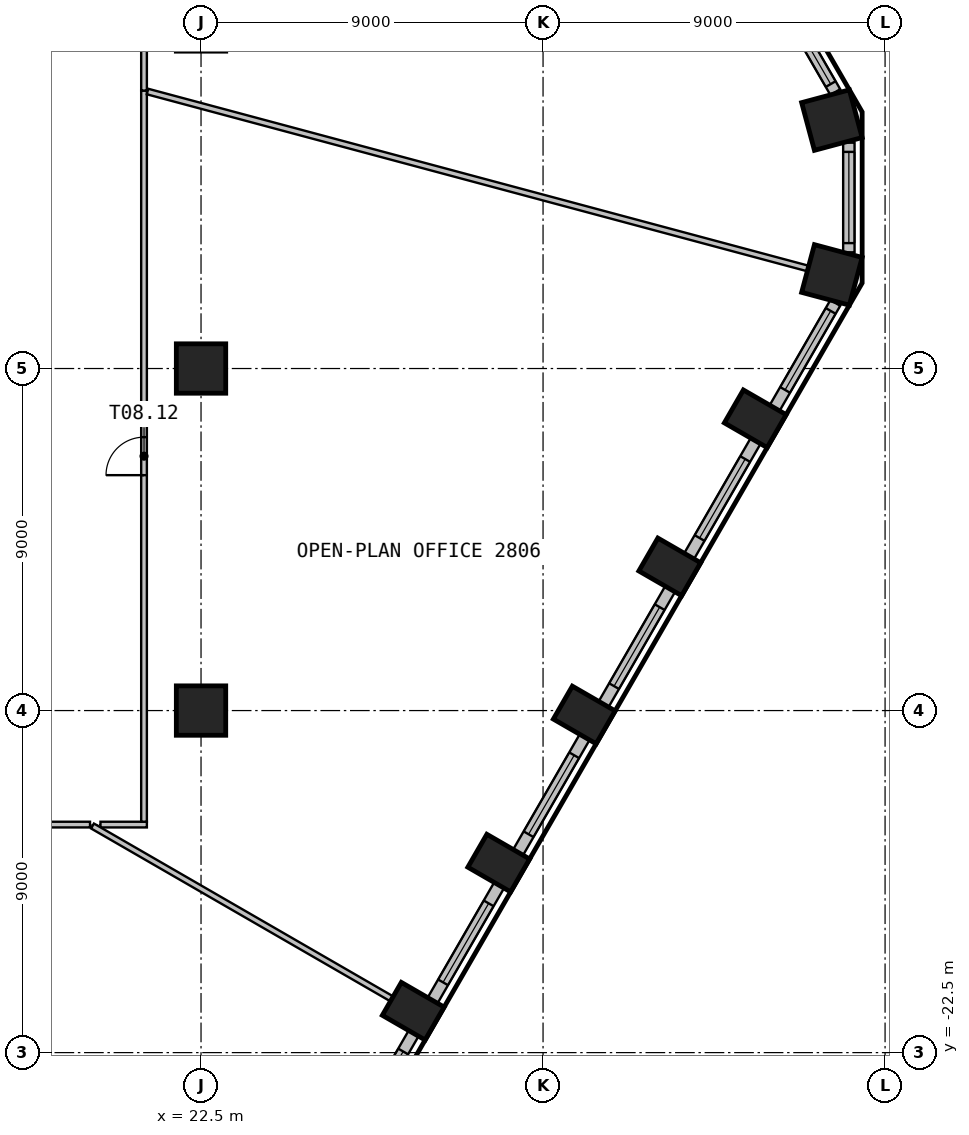
"""IFC4 building model, lengths in metres.
Left out: names, types, materials, properties, quantities, classifications, styles, units other than length and angle.
Written with IfcOpenShell. Run it as: python <this file> out.ifc"""

import sys

from ifc_helpers import new_model, si_unit, direction, frame, frame_2d, origin, origin_2d, place, context, subcontext, project, spatial, rectangle, circle, extrude, element, fill, save


model = new_model("IFC4")
c1 = context("Model", 3, precision=1e-05, world=origin(), true_north=direction((0.0, 1.0)))
c2 = subcontext(c1, "Body", "Model", "MODEL_VIEW")
j1 = project(units=[si_unit("LENGTHUNIT", "METRE"), si_unit("PLANEANGLEUNIT", "RADIAN")], contexts=[c1])
p1 = place(None, origin())
s1 = spatial("IfcSite", under=j1, at=p1, CompositionType="ELEMENT")
p2 = place(p1, origin())
s2 = spatial("IfcBuilding", under=s1, at=p2, CompositionType="ELEMENT")
p3 = place(p2, frame((0.0, 0.0, 116.4)))
s3 = spatial("IfcBuildingStorey", under=s2, at=p3, CompositionType="ELEMENT", Elevation=116.4)
for number, where, z_axis, x_axis in (
    (1, (28.084, -21.411, 0.0), (0.0, 0.0, 1.0), (0.5, 0.866, 0.0)),
    (2, (30.334, -17.513, 0.0), (0.0, 0.0, 1.0), (0.5, 0.866, 0.0)),
    (3, (32.584, -13.616, 0.0), (0.0, 0.0, 1.0), (0.5, 0.866, 0.0)),
    (4, (34.834, -9.719, 0.0), (0.0, 0.0, 1.0), (0.5, 0.866, 0.0)),
    (5, (37.084, -5.822, 0.0), (0.0, 0.0, 1.0), (0.5, 0.866, 0.0)),
):
    element("IfcColumn", number, at=place(p3, frame(where, z_axis=z_axis, x_axis=x_axis)), inside=s3, PredefinedType="COLUMN", context=c2, shape_type="SweptSolid", body=[
        extrude(rectangle(XDim=1.0, YDim=1.3, at=origin_2d()), origin(), (0.0, 0.0, 1.0), 3.525),
    ])
for number, where, z_axis, x_axis in (
    (6, (39.101, -2.037, 0.0), (0.0, 0.0, 1.0), (0.259, 0.966, 0.0)),
    (7, (39.101, 2.037, 0.0), (0.0, 0.0, 1.0), (-0.259, 0.966, 0.0)),
):
    element("IfcColumn", number, at=place(p3, frame(where, z_axis=z_axis, x_axis=x_axis)), inside=s3, PredefinedType="COLUMN", context=c2, shape_type="SweptSolid", body=[
        extrude(rectangle(XDim=1.3, YDim=1.3, at=origin_2d()), origin(), (0.0, 0.0, 1.0), 3.525),
    ])
for number, where, z_axis, x_axis in (
    (8, (22.5, -13.5, 0.0), (0.0, 0.0, 1.0), (1.0, 0.0, 0.0)),
    (9, (22.5, -4.5, 0.0), (0.0, 0.0, 1.0), (1.0, 0.0, 0.0)),
):
    element("IfcColumn", number, at=place(p3, frame(where, z_axis=z_axis, x_axis=x_axis)), inside=s3, PredefinedType="COLUMN", context=c2, shape_type="SweptSolid", body=[
        extrude(circle(Radius=0.65, at=origin_2d()), origin(), (0.0, 0.0, 1.0), 3.525),
    ])
p4 = place(p3, frame((26.344, -25.024, 0.0), z_axis=(0.0, 0.0, 1.0), x_axis=(0.499996256241, 0.866027565234, 0.0)))
e10 = element("IfcWall", 10, at=p4, inside=s3, PredefinedType="SOLIDWALL", context=c2, shape_type="SweptSolid", body=[
    extrude(rectangle(XDim=3.499, YDim=0.3, at=frame_2d((1.75, 0.0))), origin(), (0.0, 0.0, 1.0), 3.525),
])
p5 = place(p4, frame((0.55, 0.0, 0.9)))
e11 = element("IfcOpeningElement", 11, at=p5, cuts=e10, PredefinedType="OPENING", context=c2, shape_type="SweptSolid", body=[
    extrude(rectangle(XDim=2.4, YDim=2.1, at=frame_2d((1.2, 1.05))), frame((0.0, 0.16, 0.0), z_axis=(0.0, -1.0, 0.0), x_axis=(1.0, 0.0, 0.0)), (0.0, 0.0, 1.0), 0.32),
])
p6 = place(p3, frame((28.594, -21.127, 0.0), z_axis=(0.0, 0.0, 1.0), x_axis=(0.499996256241, 0.866027565234, 0.0)))
e12 = element("IfcWall", 12, at=p6, inside=s3, PredefinedType="SOLIDWALL", context=c2, shape_type="SweptSolid", body=[
    extrude(rectangle(XDim=3.499, YDim=0.3, at=frame_2d((1.75, 0.0))), origin(), (0.0, 0.0, 1.0), 3.525),
])
p7 = place(p6, frame((0.55, 0.0, 0.9)))
e13 = element("IfcOpeningElement", 13, at=p7, cuts=e12, PredefinedType="OPENING", context=c2, shape_type="SweptSolid", body=[
    extrude(rectangle(XDim=2.4, YDim=2.1, at=frame_2d((1.2, 1.05))), frame((0.0, 0.16, 0.0), z_axis=(0.0, -1.0, 0.0), x_axis=(1.0, 0.0, 0.0)), (0.0, 0.0, 1.0), 0.32),
])
p8 = place(p3, frame((30.844, -17.23, 0.0), z_axis=(0.0, 0.0, 1.0), x_axis=(0.499996256241, 0.866027565234, 0.0)))
e14 = element("IfcWall", 14, at=p8, inside=s3, PredefinedType="SOLIDWALL", context=c2, shape_type="SweptSolid", body=[
    extrude(rectangle(XDim=3.499, YDim=0.3, at=frame_2d((1.75, 0.0))), origin(), (0.0, 0.0, 1.0), 3.525),
])
p9 = place(p8, frame((0.55, 0.0, 0.9)))
e15 = element("IfcOpeningElement", 15, at=p9, cuts=e14, PredefinedType="OPENING", context=c2, shape_type="SweptSolid", body=[
    extrude(rectangle(XDim=2.4, YDim=2.1, at=frame_2d((1.2, 1.05))), frame((0.0, 0.16, 0.0), z_axis=(0.0, -1.0, 0.0), x_axis=(1.0, 0.0, 0.0)), (0.0, 0.0, 1.0), 0.32),
])
p10 = place(p3, frame((33.094, -13.333, 0.0), z_axis=(0.0, 0.0, 1.0), x_axis=(0.499996256241, 0.866027565234, 0.0)))
e16 = element("IfcWall", 16, at=p10, inside=s3, PredefinedType="SOLIDWALL", context=c2, shape_type="SweptSolid", body=[
    extrude(rectangle(XDim=3.499, YDim=0.3, at=frame_2d((1.75, 0.0))), origin(), (0.0, 0.0, 1.0), 3.525),
])
p11 = place(p10, frame((0.55, 0.0, 0.9)))
e17 = element("IfcOpeningElement", 17, at=p11, cuts=e16, PredefinedType="OPENING", context=c2, shape_type="SweptSolid", body=[
    extrude(rectangle(XDim=2.4, YDim=2.1, at=frame_2d((1.2, 1.05))), frame((0.0, 0.16, 0.0), z_axis=(0.0, -1.0, 0.0), x_axis=(1.0, 0.0, 0.0)), (0.0, 0.0, 1.0), 0.32),
])
p12 = place(p3, frame((35.344, -9.436, 0.0), z_axis=(0.0, 0.0, 1.0), x_axis=(0.499996256241, 0.866027565234, 0.0)))
e18 = element("IfcWall", 18, at=p12, inside=s3, PredefinedType="SOLIDWALL", context=c2, shape_type="SweptSolid", body=[
    extrude(rectangle(XDim=3.499, YDim=0.3, at=frame_2d((1.75, 0.0))), origin(), (0.0, 0.0, 1.0), 3.525),
])
p13 = place(p12, frame((0.55, 0.0, 0.9)))
e19 = element("IfcOpeningElement", 19, at=p13, cuts=e18, PredefinedType="OPENING", context=c2, shape_type="SweptSolid", body=[
    extrude(rectangle(XDim=2.4, YDim=2.1, at=frame_2d((1.2, 1.05))), frame((0.0, 0.16, 0.0), z_axis=(0.0, -1.0, 0.0), x_axis=(1.0, 0.0, 0.0)), (0.0, 0.0, 1.0), 0.32),
])
p14 = place(p3, frame((37.594, -5.539, 0.0), z_axis=(0.0, 0.0, 1.0), x_axis=(0.500004907028, 0.866022570692, 0.0)))
e20 = element("IfcWall", 20, at=p14, inside=s3, PredefinedType="SOLIDWALL", context=c2, shape_type="SweptSolid", body=[
    extrude(rectangle(XDim=3.192, YDim=0.3, at=frame_2d((1.596, 0.0))), origin(), (0.0, 0.0, 1.0), 3.525),
])
p15 = place(p14, frame((0.55, 0.0, 0.9)))
e21 = element("IfcOpeningElement", 21, at=p15, cuts=e20, PredefinedType="OPENING", context=c2, shape_type="SweptSolid", body=[
    extrude(rectangle(XDim=2.4, YDim=2.1, at=frame_2d((1.2, 1.05))), frame((0.0, 0.16, 0.0), z_axis=(0.0, -1.0, 0.0), x_axis=(1.0, 0.0, 0.0)), (0.0, 0.0, 1.0), 0.32),
])
p16 = place(p3, frame((39.547, -1.443, 0.0), z_axis=(0.0, 0.0, 1.0), x_axis=(0.0, 1.0, 0.0)))
e22 = element("IfcWall", 22, at=p16, inside=s3, PredefinedType="SOLIDWALL", context=c2, shape_type="SweptSolid", body=[
    extrude(rectangle(XDim=2.886, YDim=0.3, at=frame_2d((1.443, 0.0))), origin(), (0.0, 0.0, 1.0), 3.525),
])
p17 = place(p16, frame((0.243, 0.0, 0.9)))
e23 = element("IfcOpeningElement", 23, at=p17, cuts=e22, PredefinedType="OPENING", context=c2, shape_type="SweptSolid", body=[
    extrude(rectangle(XDim=2.4, YDim=2.1, at=frame_2d((1.2, 1.05))), frame((0.0, 0.16, 0.0), z_axis=(0.0, -1.0, 0.0), x_axis=(1.0, 0.0, 0.0)), (0.0, 0.0, 1.0), 0.32),
])
p18 = place(p3, frame((39.19, 2.774, 0.0), z_axis=(0.0, 0.0, 1.0), x_axis=(-0.500004907028, 0.866022570692, 0.0)))
e24 = element("IfcWall", 24, at=p18, inside=s3, PredefinedType="SOLIDWALL", context=c2, shape_type="SweptSolid", body=[
    extrude(rectangle(XDim=3.192, YDim=0.3, at=frame_2d((1.596, 0.0))), origin(), (0.0, 0.0, 1.0), 3.525),
])
p19 = place(p18, frame((0.243, 0.0, 0.9)))
e25 = element("IfcOpeningElement", 25, at=p19, cuts=e24, PredefinedType="OPENING", context=c2, shape_type="SweptSolid", body=[
    extrude(rectangle(XDim=2.4, YDim=2.1, at=frame_2d((1.2, 1.05))), frame((0.0, 0.16, 0.0), z_axis=(0.0, -1.0, 0.0), x_axis=(1.0, 0.0, 0.0)), (0.0, 0.0, 1.0), 0.32),
])
p20 = place(p3, frame((11.25, -16.5, 0.0), z_axis=(0.0, 0.0, 1.0), x_axis=(1.0, 0.0, 0.0)))
e26 = element("IfcWall", 26, at=p20, inside=s3, PredefinedType="PARTITIONING", context=c2, shape_type="SweptSolid", body=[
    extrude(rectangle(XDim=8.329, YDim=0.15, at=frame_2d((4.165, 0.0))), origin(), (0.0, 0.0, 1.0), 3.525),
])
p21 = place(p3, frame((19.854, -16.5, 0.0), z_axis=(0.0, 0.0, 1.0), x_axis=(1.0, 0.0, 0.0)))
e27 = element("IfcWall", 27, at=p21, inside=s3, PredefinedType="PARTITIONING", context=c2, shape_type="SweptSolid", body=[
    extrude(rectangle(XDim=1.221, YDim=0.15, at=frame_2d((0.61, 0.0))), origin(), (0.0, 0.0, 1.0), 3.525),
])
p22 = place(p3, frame((19.644, -16.538, 0.0), z_axis=(0.0, 0.0, 1.0), x_axis=(0.866004606565, -0.500036020111, 0.0)))
e28 = element("IfcWall", 28, at=p22, inside=s3, PredefinedType="PARTITIONING", context=c2, shape_type="SweptSolid", body=[
    extrude(rectangle(XDim=9.076, YDim=0.15, at=frame_2d((4.538, 0.0))), origin(), (0.0, 0.0, 1.0), 3.525),
])
p23 = place(p3, frame((21.0, -16.425, 0.0), z_axis=(0.0, 0.0, 1.0), x_axis=(0.0, 1.0, 0.0)))
e29 = element("IfcWall", 29, at=p23, inside=s3, PredefinedType="PARTITIONING", context=c2, shape_type="SweptSolid", body=[
    extrude(rectangle(XDim=19.238, YDim=0.15, at=frame_2d((9.619, 0.0))), origin(), (0.0, 0.0, 1.0), 3.525),
])
p24 = place(p23, frame((9.119, 0.0, 0.0)))
e30 = element("IfcOpeningElement", 30, at=p24, cuts=e29, PredefinedType="OPENING", context=c2, shape_type="SweptSolid", body=[
    extrude(rectangle(XDim=1.0, YDim=2.1, at=frame_2d((0.5, 1.05))), frame((0.0, 0.085, 0.0), z_axis=(0.0, -1.0, 0.0), x_axis=(1.0, 0.0, 0.0)), (0.0, 0.0, 1.0), 0.17),
])
p25 = place(p3, frame((21.0, 2.813, 0.0), z_axis=(0.0, 0.0, 1.0), x_axis=(0.0, 1.0, 0.0)))
e31 = element("IfcWall", 31, at=p25, inside=s3, PredefinedType="PARTITIONING", context=c2, shape_type="SweptSolid", body=[
    extrude(rectangle(XDim=13.612, YDim=0.15, at=frame_2d((6.806, 0.0))), origin(), (0.0, 0.0, 1.0), 3.525),
])
p26 = place(p25, frame((6.306, 0.0, 0.0)))
e32 = element("IfcOpeningElement", 32, at=p26, cuts=e31, PredefinedType="OPENING", context=c2, shape_type="SweptSolid", body=[
    extrude(rectangle(XDim=1.0, YDim=2.1, at=frame_2d((0.5, 1.05))), frame((0.0, 0.085, 0.0), z_axis=(0.0, -1.0, 0.0), x_axis=(1.0, 0.0, 0.0)), (0.0, 0.0, 1.0), 0.17),
])
p27 = place(p3, frame((38.454, -1.864, 0.0), z_axis=(0.0, 0.0, 1.0), x_axis=(-0.965925618712, 0.25881981979, 0.0)))
e33 = element("IfcWall", 33, at=p27, inside=s3, PredefinedType="PARTITIONING", context=c2, shape_type="SweptSolid", body=[
    extrude(rectangle(XDim=17.974, YDim=0.15, at=frame_2d((8.987, 0.0))), origin(), (0.0, 0.0, 1.0), 3.525),
])
p28 = place(p5, origin())
e34 = element("IfcWindow", 34, at=p28, inside=s3, PartitioningType="SINGLE_PANEL", PredefinedType="WINDOW", context=c2, shape_type="SweptSolid", body=[
    extrude(rectangle(XDim=2.4, YDim=2.1, at=frame_2d((1.2, 1.05))), frame((0.0, 0.03, 0.0), z_axis=(0.0, -1.0, 0.0), x_axis=(1.0, 0.0, 0.0)), (0.0, 0.0, 1.0), 0.06),
])
fill(e11, e34)
p29 = place(p7, origin())
e35 = element("IfcWindow", 35, at=p29, inside=s3, PartitioningType="SINGLE_PANEL", PredefinedType="WINDOW", context=c2, shape_type="SweptSolid", body=[
    extrude(rectangle(XDim=2.4, YDim=2.1, at=frame_2d((1.2, 1.05))), frame((0.0, 0.03, 0.0), z_axis=(0.0, -1.0, 0.0), x_axis=(1.0, 0.0, 0.0)), (0.0, 0.0, 1.0), 0.06),
])
fill(e13, e35)
p30 = place(p9, origin())
e36 = element("IfcWindow", 36, at=p30, inside=s3, PartitioningType="SINGLE_PANEL", PredefinedType="WINDOW", context=c2, shape_type="SweptSolid", body=[
    extrude(rectangle(XDim=2.4, YDim=2.1, at=frame_2d((1.2, 1.05))), frame((0.0, 0.03, 0.0), z_axis=(0.0, -1.0, 0.0), x_axis=(1.0, 0.0, 0.0)), (0.0, 0.0, 1.0), 0.06),
])
fill(e15, e36)
p31 = place(p11, origin())
e37 = element("IfcWindow", 37, at=p31, inside=s3, PartitioningType="SINGLE_PANEL", PredefinedType="WINDOW", context=c2, shape_type="SweptSolid", body=[
    extrude(rectangle(XDim=2.4, YDim=2.1, at=frame_2d((1.2, 1.05))), frame((0.0, 0.03, 0.0), z_axis=(0.0, -1.0, 0.0), x_axis=(1.0, 0.0, 0.0)), (0.0, 0.0, 1.0), 0.06),
])
fill(e17, e37)
p32 = place(p13, origin())
e38 = element("IfcWindow", 38, at=p32, inside=s3, PartitioningType="SINGLE_PANEL", PredefinedType="WINDOW", context=c2, shape_type="SweptSolid", body=[
    extrude(rectangle(XDim=2.4, YDim=2.1, at=frame_2d((1.2, 1.05))), frame((0.0, 0.03, 0.0), z_axis=(0.0, -1.0, 0.0), x_axis=(1.0, 0.0, 0.0)), (0.0, 0.0, 1.0), 0.06),
])
fill(e19, e38)
p33 = place(p15, origin())
e39 = element("IfcWindow", 39, at=p33, inside=s3, PartitioningType="SINGLE_PANEL", PredefinedType="WINDOW", context=c2, shape_type="SweptSolid", body=[
    extrude(rectangle(XDim=2.4, YDim=2.1, at=frame_2d((1.2, 1.05))), frame((0.0, 0.03, 0.0), z_axis=(0.0, -1.0, 0.0), x_axis=(1.0, 0.0, 0.0)), (0.0, 0.0, 1.0), 0.06),
])
fill(e21, e39)
p34 = place(p17, origin())
e40 = element("IfcWindow", 40, at=p34, inside=s3, PartitioningType="SINGLE_PANEL", PredefinedType="WINDOW", context=c2, shape_type="SweptSolid", body=[
    extrude(rectangle(XDim=2.4, YDim=2.1, at=frame_2d((1.2, 1.05))), frame((0.0, 0.03, 0.0), z_axis=(0.0, -1.0, 0.0), x_axis=(1.0, 0.0, 0.0)), (0.0, 0.0, 1.0), 0.06),
])
fill(e23, e40)
p35 = place(p19, origin())
e41 = element("IfcWindow", 41, at=p35, inside=s3, PartitioningType="SINGLE_PANEL", PredefinedType="WINDOW", context=c2, shape_type="SweptSolid", body=[
    extrude(rectangle(XDim=2.4, YDim=2.1, at=frame_2d((1.2, 1.05))), frame((0.0, 0.03, 0.0), z_axis=(0.0, -1.0, 0.0), x_axis=(1.0, 0.0, 0.0)), (0.0, 0.0, 1.0), 0.06),
])
fill(e25, e41)
p36 = place(p24, origin())
e42 = element("IfcDoor", 42, at=p36, inside=s3, OperationType="SINGLE_SWING_RIGHT", PredefinedType="DOOR", context=c2, shape_type="SweptSolid", body=[
    extrude(rectangle(XDim=1.0, YDim=2.1, at=frame_2d((0.5, 1.05))), frame((0.0, 0.025, 0.0), z_axis=(0.0, -1.0, 0.0), x_axis=(1.0, 0.0, 0.0)), (0.0, 0.0, 1.0), 0.05),
])
fill(e30, e42)
save(model, sys.argv[1])
